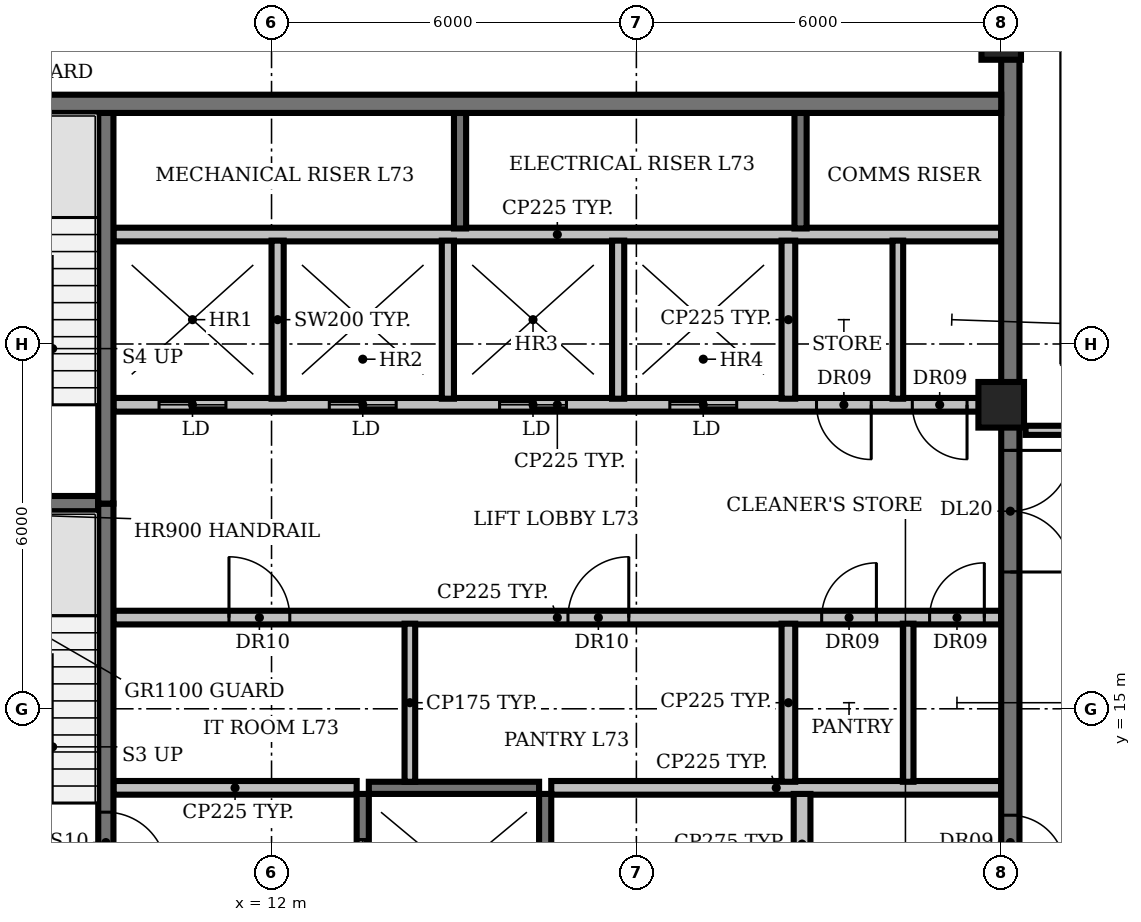
"""IFC4 building model, lengths in metres.
Left out: names, types, materials, properties, quantities, classifications, styles, units other than length and angle.
Written with IfcOpenShell. Run it as: python <this file> out.ifc"""

import sys

from ifc_helpers import new_model, si_unit, direction, frame, frame_2d, origin, origin_2d, place, context, subcontext, project, spatial, rectangle, circle, extrude, element, fill, save


model = new_model("IFC4")
c1 = context("Model", 3, precision=1e-05, world=origin(), true_north=direction((0.0, 1.0)))
c2 = subcontext(c1, "Body", "Model", "MODEL_VIEW")
j1 = project(units=[si_unit("LENGTHUNIT", "METRE"), si_unit("PLANEANGLEUNIT", "RADIAN")], contexts=[c1])
p1 = place(None, origin())
s1 = spatial("IfcSite", under=j1, at=p1, CompositionType="ELEMENT")
p2 = place(p1, origin())
s2 = spatial("IfcBuilding", under=s1, at=p2, CompositionType="ELEMENT")
p3 = place(p2, frame((0.0, 0.0, 327.2)))
s3 = spatial("IfcBuildingStorey", under=s2, at=p3, CompositionType="ELEMENT", Elevation=327.2)
p4 = place(p3, frame((24.0, 20.0, 0.0), z_axis=(0.0, 0.0, 1.0), x_axis=(1.0, 0.0, 0.0)))
e1 = element("IfcColumn", 1, at=p4, inside=s3, PredefinedType="COLUMN", context=c2, shape_type="SweptSolid", body=[
    extrude(circle(Radius=0.375, at=origin_2d()), origin(), (0.0, 0.0, 1.0), 3.9),
])
p5 = place(p3, frame((24.0, 26.0, 0.0), z_axis=(0.0, 0.0, 1.0), x_axis=(1.0, 0.0, 0.0)))
e2 = element("IfcColumn", 2, at=p5, inside=s3, PredefinedType="COLUMN", context=c2, shape_type="SweptSolid", body=[
    extrude(rectangle(XDim=0.65, YDim=0.65, at=origin_2d()), origin(), (0.0, 0.0, 1.0), 3.9),
])
p6 = place(p3, frame((9.4, 13.7, 0.0), z_axis=(0.0, 0.0, 1.0), x_axis=(1.0, 0.0, 0.0)))
e3 = element("IfcWall", 3, at=p6, inside=s3, PredefinedType="PARTITIONING", context=c2, shape_type="SweptSolid", body=[
    extrude(rectangle(XDim=4.0, YDim=0.225, at=frame_2d((2.0, 0.0))), origin(), (0.0, 0.0, 1.0), 3.9),
])
p7 = place(p3, frame((13.6, 13.7, 0.0), z_axis=(0.0, 0.0, 1.0), x_axis=(1.0, 0.0, 0.0)))
e4 = element("IfcWall", 4, at=p7, inside=s3, PredefinedType="SHEAR", context=c2, shape_type="SweptSolid", body=[
    extrude(rectangle(XDim=2.8, YDim=0.2, at=frame_2d((1.4, 0.0))), origin(), (0.0, 0.0, 1.0), 3.9),
])
p8 = place(p3, frame((16.6, 13.7, 0.0), z_axis=(0.0, 0.0, 1.0), x_axis=(1.0, 0.0, 0.0)))
e5 = element("IfcWall", 5, at=p8, inside=s3, PredefinedType="PARTITIONING", context=c2, shape_type="SweptSolid", body=[
    extrude(rectangle(XDim=7.4, YDim=0.225, at=frame_2d((3.7, 0.0))), origin(), (0.0, 0.0, 1.0), 3.9),
])
p9 = place(p3, frame((9.4, 16.5, 0.0), z_axis=(0.0, 0.0, 1.0), x_axis=(1.0, 0.0, 0.0)))
e6 = element("IfcWall", 6, at=p9, inside=s3, PredefinedType="PARTITIONING", context=c2, shape_type="SweptSolid", body=[
    extrude(rectangle(XDim=14.6, YDim=0.225, at=frame_2d((7.3, 0.0))), origin(), (0.0, 0.0, 1.0), 3.9),
])
p10 = place(p9, frame((1.9, 0.0, 0.0)))
e7 = element("IfcOpeningElement", 7, at=p10, cuts=e6, PredefinedType="OPENING", context=c2, shape_type="SweptSolid", body=[
    extrude(rectangle(XDim=1.0, YDim=2.1, at=frame_2d((0.5, 1.05))), frame((0.0, 0.123, 0.0), z_axis=(0.0, -1.0, 0.0), x_axis=(1.0, 0.0, 0.0)), (0.0, 0.0, 1.0), 0.245),
])
p11 = place(p9, frame((7.475, 0.0, 0.0)))
e8 = element("IfcOpeningElement", 8, at=p11, cuts=e6, PredefinedType="OPENING", context=c2, shape_type="SweptSolid", body=[
    extrude(rectangle(XDim=1.0, YDim=2.1, at=frame_2d((0.5, 1.05))), frame((0.0, 0.123, 0.0), z_axis=(0.0, -1.0, 0.0), x_axis=(1.0, 0.0, 0.0)), (0.0, 0.0, 1.0), 0.245),
])
p12 = place(p9, frame((11.647, 0.0, 0.0)))
e9 = element("IfcOpeningElement", 9, at=p12, cuts=e6, PredefinedType="OPENING", context=c2, shape_type="SweptSolid", body=[
    extrude(rectangle(XDim=0.9, YDim=2.1, at=frame_2d((0.45, 1.05))), frame((0.0, 0.123, 0.0), z_axis=(0.0, -1.0, 0.0), x_axis=(1.0, 0.0, 0.0)), (0.0, 0.0, 1.0), 0.245),
])
p13 = place(p9, frame((13.423, 0.0, 0.0)))
e10 = element("IfcOpeningElement", 10, at=p13, cuts=e6, PredefinedType="OPENING", context=c2, shape_type="SweptSolid", body=[
    extrude(rectangle(XDim=0.9, YDim=2.1, at=frame_2d((0.45, 1.05))), frame((0.0, 0.123, 0.0), z_axis=(0.0, -1.0, 0.0), x_axis=(1.0, 0.0, 0.0)), (0.0, 0.0, 1.0), 0.245),
])
p14 = place(p3, frame((6.0, 18.375, 0.0), z_axis=(0.0, 0.0, 1.0), x_axis=(1.0, 0.0, 0.0)))
e11 = element("IfcWall", 11, at=p14, inside=s3, PredefinedType="SHEAR", context=c2, shape_type="SweptSolid", body=[
    extrude(rectangle(XDim=3.15, YDim=0.25, at=frame_2d((1.575, 0.0))), origin(), (0.0, 0.0, 1.0), 3.9),
])
p15 = place(p3, frame((24.0, 20.0, 0.0), z_axis=(0.0, 0.0, 1.0), x_axis=(-1.0, 0.0, 0.0)))
e12 = element("IfcWall", 12, at=p15, inside=s3, PredefinedType="PARTITIONING", context=c2, shape_type="SweptSolid", body=[
    extrude(rectangle(XDim=14.6, YDim=0.225, at=frame_2d((7.3, 0.0))), origin(), (0.0, 0.0, 1.0), 3.9),
])
p16 = place(p15, frame((12.75, 0.0, 0.0)))
e13 = element("IfcOpeningElement", 13, at=p16, cuts=e12, PredefinedType="OPENING", context=c2, shape_type="SweptSolid", body=[
    extrude(rectangle(XDim=1.1, YDim=2.1, at=frame_2d((0.55, 1.05))), frame((0.0, 0.123, 0.0), z_axis=(0.0, -1.0, 0.0), x_axis=(1.0, 0.0, 0.0)), (0.0, 0.0, 1.0), 0.245),
])
p17 = place(p15, frame((9.95, 0.0, 0.0)))
e14 = element("IfcOpeningElement", 14, at=p17, cuts=e12, PredefinedType="OPENING", context=c2, shape_type="SweptSolid", body=[
    extrude(rectangle(XDim=1.1, YDim=2.1, at=frame_2d((0.55, 1.05))), frame((0.0, 0.123, 0.0), z_axis=(0.0, -1.0, 0.0), x_axis=(1.0, 0.0, 0.0)), (0.0, 0.0, 1.0), 0.245),
])
p18 = place(p15, frame((7.15, 0.0, 0.0)))
e15 = element("IfcOpeningElement", 15, at=p18, cuts=e12, PredefinedType="OPENING", context=c2, shape_type="SweptSolid", body=[
    extrude(rectangle(XDim=1.1, YDim=2.1, at=frame_2d((0.55, 1.05))), frame((0.0, 0.123, 0.0), z_axis=(0.0, -1.0, 0.0), x_axis=(1.0, 0.0, 0.0)), (0.0, 0.0, 1.0), 0.245),
])
p19 = place(p15, frame((4.35, 0.0, 0.0)))
e16 = element("IfcOpeningElement", 16, at=p19, cuts=e12, PredefinedType="OPENING", context=c2, shape_type="SweptSolid", body=[
    extrude(rectangle(XDim=1.1, YDim=2.1, at=frame_2d((0.55, 1.05))), frame((0.0, 0.123, 0.0), z_axis=(0.0, -1.0, 0.0), x_axis=(1.0, 0.0, 0.0)), (0.0, 0.0, 1.0), 0.245),
])
p20 = place(p15, frame((2.137, 0.0, 0.0)))
e17 = element("IfcOpeningElement", 17, at=p20, cuts=e12, PredefinedType="OPENING", context=c2, shape_type="SweptSolid", body=[
    extrude(rectangle(XDim=0.9, YDim=2.1, at=frame_2d((0.45, 1.05))), frame((0.0, 0.123, 0.0), z_axis=(0.0, -1.0, 0.0), x_axis=(1.0, 0.0, 0.0)), (0.0, 0.0, 1.0), 0.245),
])
p21 = place(p15, frame((0.562, 0.0, 0.0)))
e18 = element("IfcOpeningElement", 18, at=p21, cuts=e12, PredefinedType="OPENING", context=c2, shape_type="SweptSolid", body=[
    extrude(rectangle(XDim=0.9, YDim=2.1, at=frame_2d((0.45, 1.05))), frame((0.0, 0.123, 0.0), z_axis=(0.0, -1.0, 0.0), x_axis=(1.0, 0.0, 0.0)), (0.0, 0.0, 1.0), 0.245),
])
p22 = place(p3, frame((9.4, 22.8, 0.0), z_axis=(0.0, 0.0, 1.0), x_axis=(1.0, 0.0, 0.0)))
e19 = element("IfcWall", 19, at=p22, inside=s3, PredefinedType="PARTITIONING", context=c2, shape_type="SweptSolid", body=[
    extrude(rectangle(XDim=14.6, YDim=0.225, at=frame_2d((7.3, 0.0))), origin(), (0.0, 0.0, 1.0), 3.9),
])
p23 = place(p3, frame((9.275, 18.375, 0.0), z_axis=(0.0, 0.0, 1.0), x_axis=(0.0, -1.0, 0.0)))
e20 = element("IfcWall", 20, at=p23, inside=s3, PredefinedType="SHEAR", context=c2, shape_type="SweptSolid", body=[
    extrude(rectangle(XDim=6.55, YDim=0.25, at=frame_2d((3.275, 0.0))), origin(), (0.0, 0.0, 1.0), 3.9),
])
p24 = place(p23, frame((5.075, 0.0, 0.0)))
e21 = element("IfcOpeningElement", 21, at=p24, cuts=e20, PredefinedType="OPENING", context=c2, shape_type="SweptSolid", body=[
    extrude(rectangle(XDim=1.0, YDim=2.1, at=frame_2d((0.5, 1.05))), frame((0.0, 0.135, 0.0), z_axis=(0.0, -1.0, 0.0), x_axis=(1.0, 0.0, 0.0)), (0.0, 0.0, 1.0), 0.27),
])
p25 = place(p3, frame((9.275, 18.375, 0.0), z_axis=(0.0, 0.0, 1.0), x_axis=(0.0, 1.0, 0.0)))
e22 = element("IfcWall", 22, at=p25, inside=s3, PredefinedType="SHEAR", context=c2, shape_type="SweptSolid", body=[
    extrude(rectangle(XDim=6.425, YDim=0.25, at=frame_2d((3.212, 0.0))), origin(), (0.0, 0.0, 1.0), 3.9),
])
p26 = place(p3, frame((12.1, 20.1, 0.0), z_axis=(0.0, 0.0, 1.0), x_axis=(0.0, 1.0, 0.0)))
e23 = element("IfcWall", 23, at=p26, inside=s3, PredefinedType="SOLIDWALL", context=c2, shape_type="SweptSolid", body=[
    extrude(rectangle(XDim=2.6, YDim=0.2, at=frame_2d((1.3, 0.0))), origin(), (0.0, 0.0, 1.0), 3.9),
])
p27 = place(p3, frame((13.5, 5.4, 0.0), z_axis=(0.0, 0.0, 1.0), x_axis=(0.0, 1.0, 0.0)))
e24 = element("IfcWall", 24, at=p27, inside=s3, PredefinedType="SHEAR", context=c2, shape_type="SweptSolid", body=[
    extrude(rectangle(XDim=8.2, YDim=0.2, at=frame_2d((4.1, 0.0))), origin(), (0.0, 0.0, 1.0), 3.9),
])
p28 = place(p27, frame((0.75, 0.0, 0.0)))
e25 = element("IfcOpeningElement", 25, at=p28, cuts=e24, PredefinedType="OPENING", context=c2, shape_type="SweptSolid", body=[
    extrude(rectangle(XDim=1.1, YDim=2.1, at=frame_2d((0.55, 1.05))), frame((0.0, 0.11, 0.0), z_axis=(0.0, -1.0, 0.0), x_axis=(1.0, 0.0, 0.0)), (0.0, 0.0, 1.0), 0.22),
])
p29 = place(p27, frame((3.55, 0.0, 0.0)))
e26 = element("IfcOpeningElement", 26, at=p29, cuts=e24, PredefinedType="OPENING", context=c2, shape_type="SweptSolid", body=[
    extrude(rectangle(XDim=1.1, YDim=2.1, at=frame_2d((0.55, 1.05))), frame((0.0, 0.11, 0.0), z_axis=(0.0, -1.0, 0.0), x_axis=(1.0, 0.0, 0.0)), (0.0, 0.0, 1.0), 0.22),
])
p30 = place(p27, frame((6.35, 0.0, 0.0)))
e27 = element("IfcOpeningElement", 27, at=p30, cuts=e24, PredefinedType="OPENING", context=c2, shape_type="SweptSolid", body=[
    extrude(rectangle(XDim=1.1, YDim=2.1, at=frame_2d((0.55, 1.05))), frame((0.0, 0.11, 0.0), z_axis=(0.0, -1.0, 0.0), x_axis=(1.0, 0.0, 0.0)), (0.0, 0.0, 1.0), 0.22),
])
p31 = place(p3, frame((14.275, 13.8, 0.0), z_axis=(0.0, 0.0, 1.0), x_axis=(0.0, 1.0, 0.0)))
e28 = element("IfcWall", 28, at=p31, inside=s3, PredefinedType="PARTITIONING", context=c2, shape_type="SweptSolid", body=[
    extrude(rectangle(XDim=2.6, YDim=0.175, at=frame_2d((1.3, 0.0))), origin(), (0.0, 0.0, 1.0), 3.9),
])
p32 = place(p3, frame((14.9, 20.1, 0.0), z_axis=(0.0, 0.0, 1.0), x_axis=(0.0, 1.0, 0.0)))
e29 = element("IfcWall", 29, at=p32, inside=s3, PredefinedType="SOLIDWALL", context=c2, shape_type="SweptSolid", body=[
    extrude(rectangle(XDim=2.6, YDim=0.2, at=frame_2d((1.3, 0.0))), origin(), (0.0, 0.0, 1.0), 3.9),
])
p33 = place(p3, frame((15.1, 22.9, 0.0), z_axis=(0.0, 0.0, 1.0), x_axis=(0.0, 1.0, 0.0)))
e30 = element("IfcWall", 30, at=p33, inside=s3, PredefinedType="SHEAR", context=c2, shape_type="SweptSolid", body=[
    extrude(rectangle(XDim=1.9, YDim=0.2, at=frame_2d((0.95, 0.0))), origin(), (0.0, 0.0, 1.0), 3.9),
])
p34 = place(p3, frame((16.5, 5.4, 0.0), z_axis=(0.0, 0.0, 1.0), x_axis=(0.0, 1.0, 0.0)))
e31 = element("IfcWall", 31, at=p34, inside=s3, PredefinedType="SHEAR", context=c2, shape_type="SweptSolid", body=[
    extrude(rectangle(XDim=8.2, YDim=0.2, at=frame_2d((4.1, 0.0))), origin(), (0.0, 0.0, 1.0), 3.9),
])
p35 = place(p3, frame((17.7, 20.1, 0.0), z_axis=(0.0, 0.0, 1.0), x_axis=(0.0, 1.0, 0.0)))
e32 = element("IfcWall", 32, at=p35, inside=s3, PredefinedType="SOLIDWALL", context=c2, shape_type="SweptSolid", body=[
    extrude(rectangle(XDim=2.6, YDim=0.2, at=frame_2d((1.3, 0.0))), origin(), (0.0, 0.0, 1.0), 3.9),
])
for number, where, z_axis, x_axis in (
    (33, (20.5, 13.8, 0.0), (0.0, 0.0, 1.0), (0.0, 1.0, 0.0)),
    (34, (20.5, 20.1, 0.0), (0.0, 0.0, 1.0), (0.0, 1.0, 0.0)),
):
    element("IfcWall", number, at=place(p3, frame(where, z_axis=z_axis, x_axis=x_axis)), inside=s3, PredefinedType="PARTITIONING", context=c2, shape_type="SweptSolid", body=[
        extrude(rectangle(XDim=2.6, YDim=0.225, at=frame_2d((1.3, 0.0))), origin(), (0.0, 0.0, 1.0), 3.9),
    ])
p36 = place(p3, frame((20.7, 22.9, 0.0), z_axis=(0.0, 0.0, 1.0), x_axis=(0.0, 1.0, 0.0)))
e35 = element("IfcWall", 35, at=p36, inside=s3, PredefinedType="SHEAR", context=c2, shape_type="SweptSolid", body=[
    extrude(rectangle(XDim=1.9, YDim=0.2, at=frame_2d((0.95, 0.0))), origin(), (0.0, 0.0, 1.0), 3.9),
])
p37 = place(p3, frame((20.725, 11.95, 0.0), z_axis=(0.0, 0.0, 1.0), x_axis=(0.0, 1.0, 0.0)))
e36 = element("IfcWall", 36, at=p37, inside=s3, PredefinedType="PARTITIONING", context=c2, shape_type="SweptSolid", body=[
    extrude(rectangle(XDim=1.65, YDim=0.275, at=frame_2d((0.825, 0.0))), origin(), (0.0, 0.0, 1.0), 3.9),
])
for number, where, z_axis, x_axis in (
    (37, (22.3, 20.1, 0.0), (0.0, 0.0, 1.0), (0.0, 1.0, 0.0)),
    (38, (22.47, 13.8, 0.0), (0.0, 0.0, 1.0), (0.0, 1.0, 0.0)),
):
    element("IfcWall", number, at=place(p3, frame(where, z_axis=z_axis, x_axis=x_axis)), inside=s3, PredefinedType="PARTITIONING", context=c2, shape_type="SweptSolid", body=[
        extrude(rectangle(XDim=2.6, YDim=0.175, at=frame_2d((1.3, 0.0))), origin(), (0.0, 0.0, 1.0), 3.9),
    ])
p38 = place(p3, frame((24.15, 25.705, 0.0), z_axis=(0.0, 0.0, 1.0), x_axis=(0.0, -1.0, 0.0)))
e39 = element("IfcWall", 39, at=p38, inside=s3, PredefinedType="SHEAR", context=c2, shape_type="SweptSolid", body=[
    extrude(rectangle(XDim=20.605, YDim=0.3, at=frame_2d((10.302, 0.0))), origin(), (0.0, 0.0, 1.0), 3.9),
])
p39 = place(p38, frame((18.555, 0.0, 0.0)))
e40 = element("IfcOpeningElement", 40, at=p39, cuts=e39, PredefinedType="OPENING", context=c2, shape_type="SweptSolid", body=[
    extrude(rectangle(XDim=1.5, YDim=2.1, at=frame_2d((0.75, 1.05))), frame((0.0, 0.16, 0.0), z_axis=(0.0, -1.0, 0.0), x_axis=(1.0, 0.0, 0.0)), (0.0, 0.0, 1.0), 0.32),
])
p40 = place(p38, frame((12.455, 0.0, 0.0)))
e41 = element("IfcOpeningElement", 41, at=p40, cuts=e39, PredefinedType="OPENING", context=c2, shape_type="SweptSolid", body=[
    extrude(rectangle(XDim=0.9, YDim=2.1, at=frame_2d((0.45, 1.05))), frame((0.0, 0.16, 0.0), z_axis=(0.0, -1.0, 0.0), x_axis=(1.0, 0.0, 0.0)), (0.0, 0.0, 1.0), 0.32),
])
p41 = place(p38, frame((6.455, 0.0, 0.0)))
e42 = element("IfcOpeningElement", 42, at=p41, cuts=e39, PredefinedType="OPENING", context=c2, shape_type="SweptSolid", body=[
    extrude(rectangle(XDim=2.0, YDim=2.1, at=frame_2d((1.0, 1.05))), frame((0.0, 0.16, 0.0), z_axis=(0.0, -1.0, 0.0), x_axis=(1.0, 0.0, 0.0)), (0.0, 0.0, 1.0), 0.32),
])
p42 = place(p3, frame((6.0, 24.95, 0.0), z_axis=(0.0, 0.0, 1.0), x_axis=(1.0, 0.0, 0.0)))
e43 = element("IfcWall", 43, at=p42, inside=s3, PredefinedType="SHEAR", context=c2, shape_type="SweptSolid", body=[
    extrude(rectangle(XDim=18.0, YDim=0.3, at=frame_2d((9.0, 0.0))), origin(), (0.0, 0.0, 1.0), 3.9),
])
p43 = place(p3, frame((24.4, 19.58, 0.0), z_axis=(0.0, 0.0, 1.0), x_axis=(1.0, 0.0, 0.0)))
e44 = element("IfcWall", 44, at=p43, inside=s3, PredefinedType="PARTITIONING", context=c2, shape_type="SweptSolid", body=[
    extrude(rectangle(XDim=1.7, YDim=0.15, at=frame_2d((0.85, 0.0))), origin(), (0.0, 0.0, 1.0), 2.95),
])
p44 = place(p10, origin())
e45 = element("IfcDoor", 45, at=p44, inside=s3, OperationType="SINGLE_SWING_LEFT", PredefinedType="DOOR", context=c2, shape_type="SweptSolid", body=[
    extrude(rectangle(XDim=1.0, YDim=2.1, at=frame_2d((0.5, 1.05))), frame((0.0, 0.025, 0.0), z_axis=(0.0, -1.0, 0.0), x_axis=(1.0, 0.0, 0.0)), (0.0, 0.0, 1.0), 0.05),
])
fill(e7, e45)
p45 = place(p11, origin())
e46 = element("IfcDoor", 46, at=p45, inside=s3, OperationType="SINGLE_SWING_RIGHT", PredefinedType="DOOR", context=c2, shape_type="SweptSolid", body=[
    extrude(rectangle(XDim=1.0, YDim=2.1, at=frame_2d((0.5, 1.05))), frame((0.0, 0.025, 0.0), z_axis=(0.0, -1.0, 0.0), x_axis=(1.0, 0.0, 0.0)), (0.0, 0.0, 1.0), 0.05),
])
fill(e8, e46)
p46 = place(p12, origin())
e47 = element("IfcDoor", 47, at=p46, inside=s3, OperationType="SINGLE_SWING_RIGHT", PredefinedType="DOOR", context=c2, shape_type="SweptSolid", body=[
    extrude(rectangle(XDim=0.9, YDim=2.1, at=frame_2d((0.45, 1.05))), frame((0.0, 0.025, 0.0), z_axis=(0.0, -1.0, 0.0), x_axis=(1.0, 0.0, 0.0)), (0.0, 0.0, 1.0), 0.05),
])
fill(e9, e47)
p47 = place(p13, origin())
e48 = element("IfcDoor", 48, at=p47, inside=s3, OperationType="SINGLE_SWING_RIGHT", PredefinedType="DOOR", context=c2, shape_type="SweptSolid", body=[
    extrude(rectangle(XDim=0.9, YDim=2.1, at=frame_2d((0.45, 1.05))), frame((0.0, 0.025, 0.0), z_axis=(0.0, -1.0, 0.0), x_axis=(1.0, 0.0, 0.0)), (0.0, 0.0, 1.0), 0.05),
])
fill(e10, e48)
p48 = place(p16, origin())
e49 = element("IfcDoor", 49, at=p48, inside=s3, OperationType="DOUBLE_DOOR_SLIDING", PredefinedType="DOOR", context=c2, shape_type="SweptSolid", body=[
    extrude(rectangle(XDim=1.1, YDim=2.1, at=frame_2d((0.55, 1.05))), frame((0.0, 0.025, 0.0), z_axis=(0.0, -1.0, 0.0), x_axis=(1.0, 0.0, 0.0)), (0.0, 0.0, 1.0), 0.05),
])
fill(e13, e49)
p49 = place(p17, origin())
e50 = element("IfcDoor", 50, at=p49, inside=s3, OperationType="DOUBLE_DOOR_SLIDING", PredefinedType="DOOR", context=c2, shape_type="SweptSolid", body=[
    extrude(rectangle(XDim=1.1, YDim=2.1, at=frame_2d((0.55, 1.05))), frame((0.0, 0.025, 0.0), z_axis=(0.0, -1.0, 0.0), x_axis=(1.0, 0.0, 0.0)), (0.0, 0.0, 1.0), 0.05),
])
fill(e14, e50)
p50 = place(p18, origin())
e51 = element("IfcDoor", 51, at=p50, inside=s3, OperationType="DOUBLE_DOOR_SLIDING", PredefinedType="DOOR", context=c2, shape_type="SweptSolid", body=[
    extrude(rectangle(XDim=1.1, YDim=2.1, at=frame_2d((0.55, 1.05))), frame((0.0, 0.025, 0.0), z_axis=(0.0, -1.0, 0.0), x_axis=(1.0, 0.0, 0.0)), (0.0, 0.0, 1.0), 0.05),
])
fill(e15, e51)
p51 = place(p19, origin())
e52 = element("IfcDoor", 52, at=p51, inside=s3, OperationType="DOUBLE_DOOR_SLIDING", PredefinedType="DOOR", context=c2, shape_type="SweptSolid", body=[
    extrude(rectangle(XDim=1.1, YDim=2.1, at=frame_2d((0.55, 1.05))), frame((0.0, 0.025, 0.0), z_axis=(0.0, -1.0, 0.0), x_axis=(1.0, 0.0, 0.0)), (0.0, 0.0, 1.0), 0.05),
])
fill(e16, e52)
p52 = place(p20, origin())
e53 = element("IfcDoor", 53, at=p52, inside=s3, OperationType="SINGLE_SWING_LEFT", PredefinedType="DOOR", context=c2, shape_type="SweptSolid", body=[
    extrude(rectangle(XDim=0.9, YDim=2.1, at=frame_2d((0.45, 1.05))), frame((0.0, 0.025, 0.0), z_axis=(0.0, -1.0, 0.0), x_axis=(1.0, 0.0, 0.0)), (0.0, 0.0, 1.0), 0.05),
])
fill(e17, e53)
p53 = place(p21, origin())
e54 = element("IfcDoor", 54, at=p53, inside=s3, OperationType="SINGLE_SWING_LEFT", PredefinedType="DOOR", context=c2, shape_type="SweptSolid", body=[
    extrude(rectangle(XDim=0.9, YDim=2.1, at=frame_2d((0.45, 1.05))), frame((0.0, 0.025, 0.0), z_axis=(0.0, -1.0, 0.0), x_axis=(1.0, 0.0, 0.0)), (0.0, 0.0, 1.0), 0.05),
])
fill(e18, e54)
p54 = place(p24, origin())
e55 = element("IfcDoor", 55, at=p54, inside=s3, OperationType="SINGLE_SWING_RIGHT", PredefinedType="DOOR", context=c2, shape_type="SweptSolid", body=[
    extrude(rectangle(XDim=1.0, YDim=2.1, at=frame_2d((0.5, 1.05))), frame((0.0, 0.025, 0.0), z_axis=(0.0, -1.0, 0.0), x_axis=(1.0, 0.0, 0.0)), (0.0, 0.0, 1.0), 0.05),
])
fill(e21, e55)
p55 = place(p30, origin())
e56 = element("IfcDoor", 56, at=p55, inside=s3, OperationType="DOUBLE_DOOR_SLIDING", PredefinedType="DOOR", context=c2, shape_type="SweptSolid", body=[
    extrude(rectangle(XDim=1.1, YDim=2.1, at=frame_2d((0.55, 1.05))), frame((0.0, 0.025, 0.0), z_axis=(0.0, -1.0, 0.0), x_axis=(1.0, 0.0, 0.0)), (0.0, 0.0, 1.0), 0.05),
])
fill(e27, e56)
p56 = place(p40, origin())
e57 = element("IfcDoor", 57, at=p56, inside=s3, OperationType="SINGLE_SWING_RIGHT", PredefinedType="DOOR", context=c2, shape_type="SweptSolid", body=[
    extrude(rectangle(XDim=0.9, YDim=2.1, at=frame_2d((0.45, 1.05))), frame((0.0, 0.025, 0.0), z_axis=(0.0, -1.0, 0.0), x_axis=(1.0, 0.0, 0.0)), (0.0, 0.0, 1.0), 0.05),
])
fill(e41, e57)
p57 = place(p41, origin())
e58 = element("IfcDoor", 58, at=p57, inside=s3, OperationType="DOUBLE_DOOR_SINGLE_SWING", PredefinedType="DOOR", context=c2, shape_type="SweptSolid", body=[
    extrude(rectangle(XDim=2.0, YDim=2.1, at=frame_2d((1.0, 1.05))), frame((0.0, 0.025, 0.0), z_axis=(0.0, -1.0, 0.0), x_axis=(1.0, 0.0, 0.0)), (0.0, 0.0, 1.0), 0.05),
])
fill(e42, e58)
save(model, sys.argv[1])
